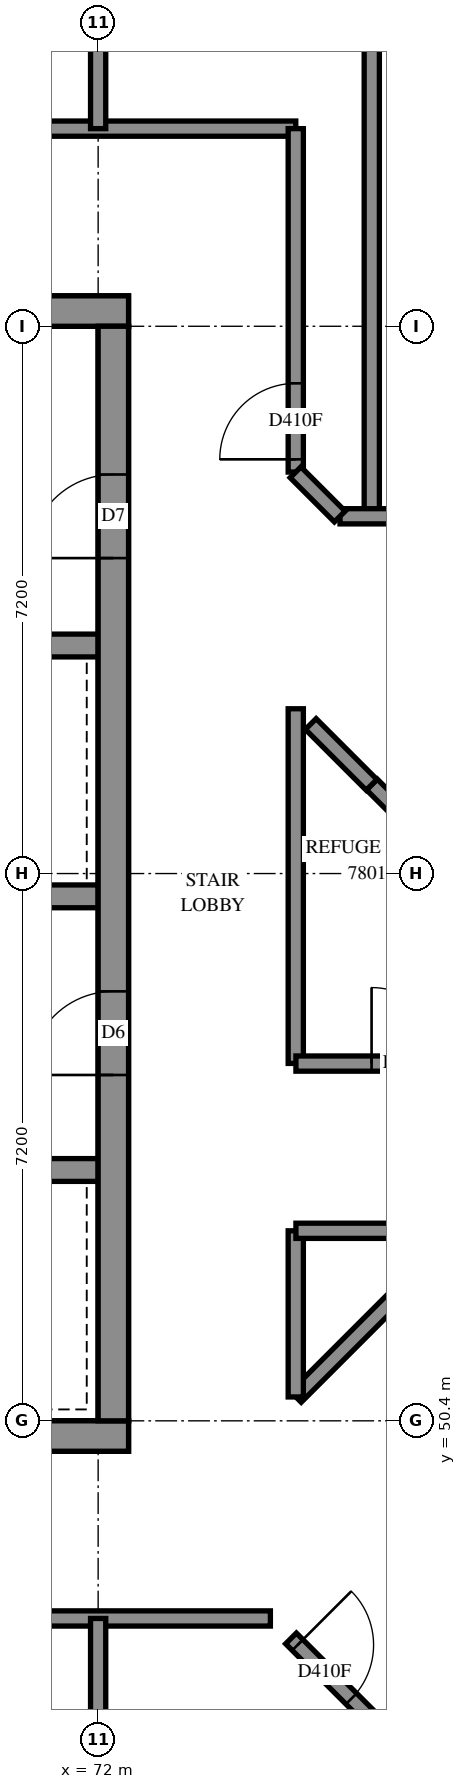
"""IFC4 building model, lengths in metres.
Left out: names, types, materials, properties, quantities, classifications, styles, units other than length and angle.
Written with IfcOpenShell. Run it as: python <this file> out.ifc"""

import sys

from ifc_helpers import new_model, si_unit, direction, frame, frame_2d, origin, place, context, subcontext, project, spatial, rectangle, extrude, element, fill, save


model = new_model("IFC4")
c1 = context("Model", 3, precision=1e-05, world=origin(), true_north=direction((0.0, 1.0)))
c2 = subcontext(c1, "Body", "Model", "MODEL_VIEW")
j1 = project(units=[si_unit("LENGTHUNIT", "METRE"), si_unit("PLANEANGLEUNIT", "RADIAN")], contexts=[c1])
p1 = place(None, origin())
s1 = spatial("IfcSite", under=j1, at=p1, CompositionType="ELEMENT")
p2 = place(p1, origin())
s2 = spatial("IfcBuilding", under=s1, at=p2, CompositionType="ELEMENT")
p3 = place(p2, frame((0.0, 0.0, 284.6)))
s3 = spatial("IfcBuildingStorey", under=s2, at=p3, CompositionType="ELEMENT", Elevation=284.6)
p4 = place(p3, frame((57.2, 50.2, -0.3), z_axis=(0.0, 0.0, 1.0), x_axis=(1.0, 0.0, 0.0)))
e1 = element("IfcWall", 1, at=p4, inside=s3, PredefinedType="SHEAR", context=c2, shape_type="SweptSolid", body=[
    extrude(rectangle(XDim=15.2, YDim=0.4, at=frame_2d((7.6, 0.0))), origin(), (0.0, 0.0, 1.0), 5.3),
])
p5 = place(p3, frame((57.2, 65.0, -0.3), z_axis=(0.0, 0.0, 1.0), x_axis=(1.0, 0.0, 0.0)))
e2 = element("IfcWall", 2, at=p5, inside=s3, PredefinedType="SHEAR", context=c2, shape_type="SweptSolid", body=[
    extrude(rectangle(XDim=15.2, YDim=0.4, at=frame_2d((7.6, 0.0))), origin(), (0.0, 0.0, 1.0), 5.3),
])
p6 = place(p5, frame((10.4, 0.0, 0.3)))
e3 = element("IfcOpeningElement", 3, at=p6, cuts=e2, PredefinedType="OPENING", context=c2, shape_type="SweptSolid", body=[
    extrude(rectangle(XDim=0.8, YDim=2.1, at=frame_2d((0.4, 1.05))), frame((0.0, 0.21, 0.0), z_axis=(0.0, -1.0, 0.0), x_axis=(1.0, 0.0, 0.0)), (0.0, 0.0, 1.0), 0.42),
])
p7 = place(p3, frame((72.2, 50.4, -0.3), z_axis=(0.0, 0.0, 1.0), x_axis=(0.0, 1.0, 0.0)))
e4 = element("IfcWall", 4, at=p7, inside=s3, PredefinedType="SHEAR", context=c2, shape_type="SweptSolid", body=[
    extrude(rectangle(XDim=14.4, YDim=0.4, at=frame_2d((7.2, 0.0))), origin(), (0.0, 0.0, 1.0), 5.3),
])
p8 = place(p7, frame((4.55, 0.0, 0.3)))
e5 = element("IfcOpeningElement", 5, at=p8, cuts=e4, PredefinedType="OPENING", context=c2, shape_type="SweptSolid", body=[
    extrude(rectangle(XDim=1.1, YDim=2.1, at=frame_2d((0.55, 1.05))), frame((0.0, 0.21, 0.0), z_axis=(0.0, -1.0, 0.0), x_axis=(1.0, 0.0, 0.0)), (0.0, 0.0, 1.0), 0.42),
])
p9 = place(p7, frame((11.35, 0.0, 0.3)))
e6 = element("IfcOpeningElement", 6, at=p9, cuts=e4, PredefinedType="OPENING", context=c2, shape_type="SweptSolid", body=[
    extrude(rectangle(XDim=1.1, YDim=2.1, at=frame_2d((0.55, 1.05))), frame((0.0, 0.21, 0.0), z_axis=(0.0, -1.0, 0.0), x_axis=(1.0, 0.0, 0.0)), (0.0, 0.0, 1.0), 0.42),
])
p10 = place(p3, frame((57.6, 53.7, 0.0), z_axis=(0.0, 0.0, 1.0), x_axis=(1.0, 0.0, 0.0)))
e7 = element("IfcWall", 7, at=p10, inside=s3, PredefinedType="SOLIDWALL", context=c2, shape_type="SweptSolid", body=[
    extrude(rectangle(XDim=14.4, YDim=0.3, at=frame_2d((7.2, 0.0))), origin(), (0.0, 0.0, 1.0), 5.7),
])
p11 = place(p10, frame((1.35, 0.0, 0.0)))
e8 = element("IfcOpeningElement", 8, at=p11, cuts=e7, PredefinedType="OPENING", context=c2, shape_type="SweptSolid", body=[
    extrude(rectangle(XDim=0.9, YDim=2.1, at=frame_2d((0.45, 1.05))), frame((0.0, 0.16, 0.0), z_axis=(0.0, -1.0, 0.0), x_axis=(1.0, 0.0, 0.0)), (0.0, 0.0, 1.0), 0.32),
])
p12 = place(p10, frame((4.95, 0.0, 0.0)))
e9 = element("IfcOpeningElement", 9, at=p12, cuts=e7, PredefinedType="OPENING", context=c2, shape_type="SweptSolid", body=[
    extrude(rectangle(XDim=0.9, YDim=2.1, at=frame_2d((0.45, 1.05))), frame((0.0, 0.16, 0.0), z_axis=(0.0, -1.0, 0.0), x_axis=(1.0, 0.0, 0.0)), (0.0, 0.0, 1.0), 0.32),
])
p13 = place(p10, frame((8.55, 0.0, 0.0)))
e10 = element("IfcOpeningElement", 10, at=p13, cuts=e7, PredefinedType="OPENING", context=c2, shape_type="SweptSolid", body=[
    extrude(rectangle(XDim=0.9, YDim=2.1, at=frame_2d((0.45, 1.05))), frame((0.0, 0.16, 0.0), z_axis=(0.0, -1.0, 0.0), x_axis=(1.0, 0.0, 0.0)), (0.0, 0.0, 1.0), 0.32),
])
p14 = place(p10, frame((12.05, 0.0, 0.0)))
e11 = element("IfcOpeningElement", 11, at=p14, cuts=e7, PredefinedType="OPENING", context=c2, shape_type="SweptSolid", body=[
    extrude(rectangle(XDim=1.1, YDim=2.1, at=frame_2d((0.55, 1.05))), frame((0.0, 0.16, 0.0), z_axis=(0.0, -1.0, 0.0), x_axis=(1.0, 0.0, 0.0)), (0.0, 0.0, 1.0), 0.32),
])
p15 = place(p3, frame((57.6, 57.3, 0.0), z_axis=(0.0, 0.0, 1.0), x_axis=(1.0, 0.0, 0.0)))
e12 = element("IfcWall", 12, at=p15, inside=s3, PredefinedType="SOLIDWALL", context=c2, shape_type="SweptSolid", body=[
    extrude(rectangle(XDim=14.4, YDim=0.3, at=frame_2d((7.2, 0.0))), origin(), (0.0, 0.0, 1.0), 5.7),
])
p16 = place(p15, frame((8.55, 0.0, 0.0)))
e13 = element("IfcOpeningElement", 13, at=p16, cuts=e12, PredefinedType="OPENING", context=c2, shape_type="SweptSolid", body=[
    extrude(rectangle(XDim=0.9, YDim=2.1, at=frame_2d((0.45, 1.05))), frame((0.0, 0.16, 0.0), z_axis=(0.0, -1.0, 0.0), x_axis=(1.0, 0.0, 0.0)), (0.0, 0.0, 1.0), 0.32),
])
p17 = place(p15, frame((12.05, 0.0, 0.0)))
e14 = element("IfcOpeningElement", 14, at=p17, cuts=e12, PredefinedType="OPENING", context=c2, shape_type="SweptSolid", body=[
    extrude(rectangle(XDim=1.1, YDim=2.1, at=frame_2d((0.55, 1.05))), frame((0.0, 0.16, 0.0), z_axis=(0.0, -1.0, 0.0), x_axis=(1.0, 0.0, 0.0)), (0.0, 0.0, 1.0), 0.32),
])
p18 = place(p3, frame((64.8, 60.6, 0.0), z_axis=(0.0, 0.0, 1.0), x_axis=(1.0, 0.0, 0.0)))
e15 = element("IfcWall", 15, at=p18, inside=s3, PredefinedType="SOLIDWALL", context=c2, shape_type="SweptSolid", body=[
    extrude(rectangle(XDim=7.2, YDim=0.3, at=frame_2d((3.6, 0.0))), origin(), (0.0, 0.0, 1.0), 5.7),
])
p19 = place(p3, frame((55.002, 67.4, 0.0), z_axis=(0.0, 0.0, 1.0), x_axis=(1.0, 0.0, 0.0)))
e16 = element("IfcWall", 16, at=p19, inside=s3, PredefinedType="PARTITIONING", context=c2, shape_type="SweptSolid", body=[
    extrude(rectangle(XDim=19.598, YDim=0.2, at=frame_2d((9.799, 0.0))), origin(), (0.0, 0.0, 1.0), 5.7),
])
p20 = place(p19, frame((8.282, 0.0, 0.0)))
e17 = element("IfcOpeningElement", 17, at=p20, cuts=e16, PredefinedType="OPENING", context=c2, shape_type="SweptSolid", body=[
    extrude(rectangle(XDim=1.0, YDim=2.1, at=frame_2d((0.5, 1.05))), frame((0.0, 0.11, 0.0), z_axis=(0.0, -1.0, 0.0), x_axis=(1.0, 0.0, 0.0)), (0.0, 0.0, 1.0), 0.22),
])
p21 = place(p19, frame((13.923, 0.0, 0.0)))
e18 = element("IfcOpeningElement", 18, at=p21, cuts=e16, PredefinedType="OPENING", context=c2, shape_type="SweptSolid", body=[
    extrude(rectangle(XDim=1.0, YDim=2.1, at=frame_2d((0.5, 1.05))), frame((0.0, 0.11, 0.0), z_axis=(0.0, -1.0, 0.0), x_axis=(1.0, 0.0, 0.0)), (0.0, 0.0, 1.0), 0.22),
])
p22 = place(p3, frame((55.0, 47.8, 0.0), z_axis=(0.0, 0.0, 1.0), x_axis=(1.0, 0.0, 0.0)))
e19 = element("IfcWall", 19, at=p22, inside=s3, PredefinedType="PARTITIONING", context=c2, shape_type="SweptSolid", body=[
    extrude(rectangle(XDim=19.266, YDim=0.2, at=frame_2d((9.633, 0.0))), origin(), (0.0, 0.0, 1.0), 5.7),
])
p23 = place(p22, frame((4.633, 0.0, 0.0)))
e20 = element("IfcOpeningElement", 20, at=p23, cuts=e19, PredefinedType="OPENING", context=c2, shape_type="SweptSolid", body=[
    extrude(rectangle(XDim=1.0, YDim=2.1, at=frame_2d((0.5, 1.05))), frame((0.0, 0.11, 0.0), z_axis=(0.0, -1.0, 0.0), x_axis=(1.0, 0.0, 0.0)), (0.0, 0.0, 1.0), 0.22),
])
p24 = place(p22, frame((6.707, 0.0, 0.0)))
e21 = element("IfcOpeningElement", 21, at=p24, cuts=e19, PredefinedType="OPENING", context=c2, shape_type="SweptSolid", body=[
    extrude(rectangle(XDim=1.0, YDim=2.1, at=frame_2d((0.5, 1.05))), frame((0.0, 0.11, 0.0), z_axis=(0.0, -1.0, 0.0), x_axis=(1.0, 0.0, 0.0)), (0.0, 0.0, 1.0), 0.22),
])
p25 = place(p22, frame((11.832, 0.0, 0.0)))
e22 = element("IfcOpeningElement", 22, at=p25, cuts=e19, PredefinedType="OPENING", context=c2, shape_type="SweptSolid", body=[
    extrude(rectangle(XDim=1.0, YDim=2.1, at=frame_2d((0.5, 1.05))), frame((0.0, 0.11, 0.0), z_axis=(0.0, -1.0, 0.0), x_axis=(1.0, 0.0, 0.0)), (0.0, 0.0, 1.0), 0.22),
])
p26 = place(p22, frame((13.908, 0.0, 0.0)))
e23 = element("IfcOpeningElement", 23, at=p26, cuts=e19, PredefinedType="OPENING", context=c2, shape_type="SweptSolid", body=[
    extrude(rectangle(XDim=1.0, YDim=2.1, at=frame_2d((0.5, 1.05))), frame((0.0, 0.11, 0.0), z_axis=(0.0, -1.0, 0.0), x_axis=(1.0, 0.0, 0.0)), (0.0, 0.0, 1.0), 0.22),
])
p27 = place(p3, frame((75.6, 62.3, 0.0), z_axis=(0.0, 0.0, 1.0), x_axis=(0.0, 1.0, 0.0)))
e24 = element("IfcWall", 24, at=p27, inside=s3, PredefinedType="PARTITIONING", context=c2, shape_type="SweptSolid", body=[
    extrude(rectangle(XDim=10.7, YDim=0.2, at=frame_2d((5.35, 0.0))), origin(), (0.0, 0.0, 1.0), 5.7),
])
p28 = place(p3, frame((74.6, 55.102, 0.0), z_axis=(0.0, 0.0, 1.0), x_axis=(0.0, 1.0, 0.0)))
e25 = element("IfcWall", 25, at=p28, inside=s3, PredefinedType="PARTITIONING", context=c2, shape_type="SweptSolid", body=[
    extrude(rectangle(XDim=4.666, YDim=0.2, at=frame_2d((2.333, 0.0))), origin(), (0.0, 0.0, 1.0), 5.7),
])
p29 = place(p3, frame((74.602, 55.1, 0.0), z_axis=(0.0, 0.0, 1.0), x_axis=(1.0, 0.0, 0.0)))
e26 = element("IfcWall", 26, at=p29, inside=s3, PredefinedType="PARTITIONING", context=c2, shape_type="SweptSolid", body=[
    extrude(rectangle(XDim=4.666, YDim=0.2, at=frame_2d((2.333, 0.0))), origin(), (0.0, 0.0, 1.0), 5.7),
])
p30 = place(p29, frame((0.995, 0.0, 0.0)))
e27 = element("IfcOpeningElement", 27, at=p30, cuts=e26, PredefinedType="OPENING", context=c2, shape_type="SweptSolid", body=[
    extrude(rectangle(XDim=1.0, YDim=2.1, at=frame_2d((0.5, 1.05))), frame((0.0, 0.11, 0.0), z_axis=(0.0, -1.0, 0.0), x_axis=(1.0, 0.0, 0.0)), (0.0, 0.0, 1.0), 0.22),
])
p31 = place(p3, frame((74.6, 62.882, 0.0), z_axis=(0.0, 0.0, 1.0), x_axis=(0.0, 1.0, 0.0)))
e28 = element("IfcWall", 28, at=p31, inside=s3, PredefinedType="PARTITIONING", context=c2, shape_type="SweptSolid", body=[
    extrude(rectangle(XDim=4.518, YDim=0.2, at=frame_2d((2.259, 0.0))), origin(), (0.0, 0.0, 1.0), 5.7),
])
p32 = place(p31, frame((0.167, 0.0, 0.0)))
e29 = element("IfcOpeningElement", 29, at=p32, cuts=e28, PredefinedType="OPENING", context=c2, shape_type="SweptSolid", body=[
    extrude(rectangle(XDim=1.0, YDim=2.1, at=frame_2d((0.5, 1.05))), frame((0.0, 0.11, 0.0), z_axis=(0.0, -1.0, 0.0), x_axis=(1.0, 0.0, 0.0)), (0.0, 0.0, 1.0), 0.22),
])
p33 = place(p3, frame((74.537, 47.538, 0.0), z_axis=(0.0, 0.0, 1.0), x_axis=(0.7071067812, -0.7071067812, 0.0)))
e30 = element("IfcWall", 30, at=p33, inside=s3, PredefinedType="PARTITIONING", context=c2, shape_type="SweptSolid", body=[
    extrude(rectangle(XDim=4.336, YDim=0.2, at=frame_2d((2.168, 0.0))), origin(), (0.0, 0.0, 1.0), 5.7),
])
p34 = place(p33, frame((0.122, 0.0, 0.0)))
e31 = element("IfcOpeningElement", 31, at=p34, cuts=e30, PredefinedType="OPENING", context=c2, shape_type="SweptSolid", body=[
    extrude(rectangle(XDim=1.0, YDim=2.1, at=frame_2d((0.5, 1.05))), frame((0.0, 0.11, 0.0), z_axis=(0.0, -1.0, 0.0), x_axis=(1.0, 0.0, 0.0)), (0.0, 0.0, 1.0), 0.22),
])
for number, where, z_axis, x_axis in (
    (32, (72.0, 42.85, 0.0), (0.0, 0.0, 1.0), (0.0, 1.0, 0.0)),
    (33, (72.0, 67.4, 0.0), (0.0, 0.0, 1.0), (0.0, 1.0, 0.0)),
):
    element("IfcWall", number, at=place(p3, frame(where, z_axis=z_axis, x_axis=x_axis)), inside=s3, PredefinedType="PARTITIONING", context=c2, shape_type="SweptSolid", body=[
        extrude(rectangle(XDim=4.95, YDim=0.2, at=frame_2d((2.475, 0.0))), origin(), (0.0, 0.0, 1.0), 5.7),
    ])
p35 = place(p3, frame((75.182, 62.3, 0.0), z_axis=(0.0, 0.0, 1.0), x_axis=(1.0, 0.0, 0.0)))
e34 = element("IfcWall", 34, at=p35, inside=s3, PredefinedType="PARTITIONING", context=c2, shape_type="SweptSolid", body=[
    extrude(rectangle(XDim=4.018, YDim=0.2, at=frame_2d((2.009, 0.0))), origin(), (0.0, 0.0, 1.0), 5.7),
])
p36 = place(p35, frame((0.943, 0.0, 0.0)))
e35 = element("IfcOpeningElement", 35, at=p36, cuts=e34, PredefinedType="OPENING", context=c2, shape_type="SweptSolid", body=[
    extrude(rectangle(XDim=1.0, YDim=2.1, at=frame_2d((0.5, 1.05))), frame((0.0, 0.11, 0.0), z_axis=(0.0, -1.0, 0.0), x_axis=(1.0, 0.0, 0.0)), (0.0, 0.0, 1.0), 0.22),
])
p37 = place(p3, frame((74.601, 50.715, 0.0), z_axis=(0.0, 0.0, 1.0), x_axis=(0.7071067812, 0.7071067812, 0.0)))
e36 = element("IfcWall", 36, at=p37, inside=s3, PredefinedType="PARTITIONING", context=c2, shape_type="SweptSolid", body=[
    extrude(rectangle(XDim=3.089, YDim=0.2, at=frame_2d((1.544, 0.0))), origin(), (0.0, 0.0, 1.0), 5.7),
])
p38 = place(p3, frame((75.601, 58.771, 0.0), z_axis=(0.0, 0.0, 1.0), x_axis=(0.7074604229, -0.7067529625, 0.0)))
e37 = element("IfcWall", 37, at=p38, inside=s3, PredefinedType="PARTITIONING", context=c2, shape_type="SweptSolid", body=[
    extrude(rectangle(XDim=2.827, YDim=0.2, at=frame_2d((1.413, 0.0))), origin(), (0.0, 0.0, 1.0), 5.7),
])
p39 = place(p3, frame((74.6, 50.714, 0.0), z_axis=(0.0, 0.0, 1.0), x_axis=(0.0, 1.0, 0.0)))
e38 = element("IfcWall", 38, at=p39, inside=s3, PredefinedType="PARTITIONING", context=c2, shape_type="SweptSolid", body=[
    extrude(rectangle(XDim=2.186, YDim=0.2, at=frame_2d((1.093, 0.0))), origin(), (0.0, 0.0, 1.0), 5.7),
])
p40 = place(p3, frame((74.602, 52.9, 0.0), z_axis=(0.0, 0.0, 1.0), x_axis=(1.0, 0.0, 0.0)))
e39 = element("IfcWall", 39, at=p40, inside=s3, PredefinedType="PARTITIONING", context=c2, shape_type="SweptSolid", body=[
    extrude(rectangle(XDim=2.184, YDim=0.2, at=frame_2d((1.092, 0.0))), origin(), (0.0, 0.0, 1.0), 5.7),
])
p41 = place(p3, frame((74.797, 59.567, 0.0), z_axis=(0.0, 0.0, 1.0), x_axis=(0.7071067812, -0.7071067812, 0.0)))
e40 = element("IfcWall", 40, at=p41, inside=s3, PredefinedType="PARTITIONING", context=c2, shape_type="SweptSolid", body=[
    extrude(rectangle(XDim=1.131, YDim=0.2, at=frame_2d((0.566, 0.0))), origin(), (0.0, 0.0, 1.0), 5.7),
])
p42 = place(p3, frame((74.597, 62.879, 0.0), z_axis=(0.0, 0.0, 1.0), x_axis=(0.7071067812, -0.7071067812, 0.0)))
e41 = element("IfcWall", 41, at=p42, inside=s3, PredefinedType="PARTITIONING", context=c2, shape_type="SweptSolid", body=[
    extrude(rectangle(XDim=0.823, YDim=0.2, at=frame_2d((0.412, 0.0))), origin(), (0.0, 0.0, 1.0), 5.7),
])
p43 = place(p8, origin())
e42 = element("IfcDoor", 42, at=p43, inside=s3, OperationType="DOUBLE_DOOR_SINGLE_SWING", PredefinedType="DOOR", context=c2, shape_type="SweptSolid", body=[
    extrude(rectangle(XDim=1.1, YDim=2.1, at=frame_2d((0.55, 1.05))), frame((0.0, 0.025, 0.0), z_axis=(0.0, -1.0, 0.0), x_axis=(1.0, 0.0, 0.0)), (0.0, 0.0, 1.0), 0.05),
])
fill(e5, e42)
p44 = place(p9, origin())
e43 = element("IfcDoor", 43, at=p44, inside=s3, OperationType="SINGLE_SWING_RIGHT", PredefinedType="DOOR", context=c2, shape_type="SweptSolid", body=[
    extrude(rectangle(XDim=1.1, YDim=2.1, at=frame_2d((0.55, 1.05))), frame((0.0, 0.025, 0.0), z_axis=(0.0, -1.0, 0.0), x_axis=(1.0, 0.0, 0.0)), (0.0, 0.0, 1.0), 0.05),
])
fill(e6, e43)
p45 = place(p30, origin())
e44 = element("IfcDoor", 44, at=p45, inside=s3, OperationType="SINGLE_SWING_LEFT", PredefinedType="DOOR", context=c2, shape_type="SweptSolid", body=[
    extrude(rectangle(XDim=1.0, YDim=2.1, at=frame_2d((0.5, 1.05))), frame((0.0, 0.025, 0.0), z_axis=(0.0, -1.0, 0.0), x_axis=(1.0, 0.0, 0.0)), (0.0, 0.0, 1.0), 0.05),
])
fill(e27, e44)
p46 = place(p32, origin())
e45 = element("IfcDoor", 45, at=p46, inside=s3, OperationType="SINGLE_SWING_RIGHT", PredefinedType="DOOR", context=c2, shape_type="SweptSolid", body=[
    extrude(rectangle(XDim=1.0, YDim=2.1, at=frame_2d((0.5, 1.05))), frame((0.0, 0.025, 0.0), z_axis=(0.0, -1.0, 0.0), x_axis=(1.0, 0.0, 0.0)), (0.0, 0.0, 1.0), 0.05),
])
fill(e29, e45)
p47 = place(p34, origin())
e46 = element("IfcDoor", 46, at=p47, inside=s3, OperationType="SINGLE_SWING_LEFT", PredefinedType="DOOR", context=c2, shape_type="SweptSolid", body=[
    extrude(rectangle(XDim=1.0, YDim=2.1, at=frame_2d((0.5, 1.05))), frame((0.0, 0.025, 0.0), z_axis=(0.0, -1.0, 0.0), x_axis=(1.0, 0.0, 0.0)), (0.0, 0.0, 1.0), 0.05),
])
fill(e31, e46)
save(model, sys.argv[1])
